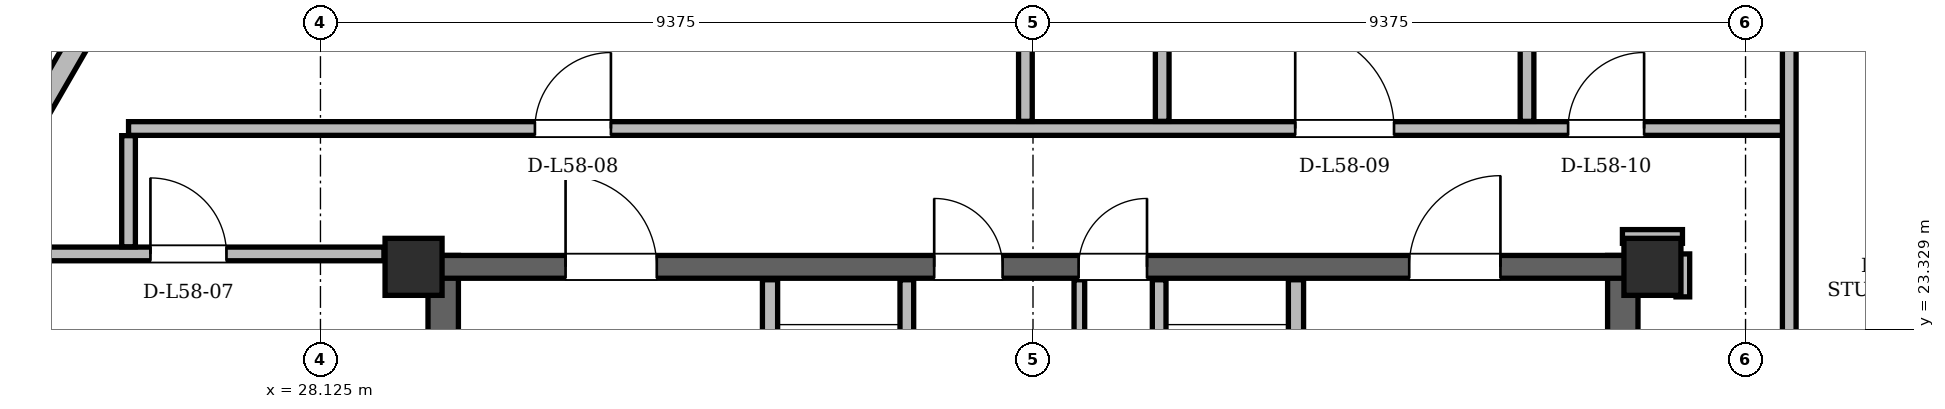
"""IFC4 building model, lengths in metres.
Left out: names, types, materials, properties, quantities, classifications, styles, units other than length and angle.
Written with IfcOpenShell. Run it as: python <this file> out.ifc"""

import sys

from ifc_helpers import new_model, si_unit, direction, frame, frame_2d, origin, origin_2d, place, context, subcontext, project, spatial, rectangle, hollow_rectangle, extrude, element, fill, save


model = new_model("IFC4")
c1 = context("Model", 3, precision=1e-05, world=origin(), true_north=direction((0.0, 1.0)))
c2 = subcontext(c1, "Body", "Model", "MODEL_VIEW")
j1 = project(units=[si_unit("LENGTHUNIT", "METRE"), si_unit("PLANEANGLEUNIT", "RADIAN")], contexts=[c1])
p1 = place(None, origin())
s1 = spatial("IfcSite", under=j1, at=p1, CompositionType="ELEMENT")
p2 = place(p1, origin())
s2 = spatial("IfcBuilding", under=s1, at=p2, CompositionType="ELEMENT")
p3 = place(p2, frame((0.0, 0.0, 219.9)))
s3 = spatial("IfcBuildingStorey", under=s2, at=p3, CompositionType="ELEMENT", Elevation=219.9)
for number, where, z_axis, x_axis in (
    (1, (45.65, 24.15, 0.0), (0.0, 0.0, 1.0), (1.0, 0.0, 0.0)),
    (2, (29.35, 24.15, 0.0), (0.0, 0.0, 1.0), (1.0, 0.0, 0.0)),
):
    element("IfcColumn", number, at=place(p3, frame(where, z_axis=z_axis, x_axis=x_axis)), inside=s3, PredefinedType="COLUMN", context=c2, shape_type="SweptSolid", body=[
        extrude(hollow_rectangle(XDim=0.75, YDim=0.75, WallThickness=0.06, at=origin_2d()), origin(), (0.0, 0.0, 1.0), 3.6),
    ])
for number, where, z_axis, x_axis in (
    (3, (29.74, 11.0, 0.0), (0.0, 0.0, 1.0), (0.0, 1.0, 0.0)),
    (4, (45.26, 11.0, 0.0), (0.0, 0.0, 1.0), (0.0, 1.0, 0.0)),
):
    element("IfcWall", number, at=place(p3, frame(where, z_axis=z_axis, x_axis=x_axis)), inside=s3, PredefinedType="SHEAR", context=c2, shape_type="SweptSolid", body=[
        extrude(rectangle(XDim=13.3, YDim=0.4, at=frame_2d((6.65, 0.0))), origin(), (0.0, 0.0, 1.0), 3.38),
    ])
p4 = place(p3, frame((29.65, 24.15, 0.0), z_axis=(0.0, 0.0, 1.0), x_axis=(1.0, 0.0, 0.0)))
e5 = element("IfcWall", 5, at=p4, inside=s3, PredefinedType="SHEAR", context=c2, shape_type="SweptSolid", body=[
    extrude(rectangle(XDim=15.7, YDim=0.3, at=frame_2d((7.85, 0.0))), origin(), (0.0, 0.0, 1.0), 3.38),
])
p5 = place(p4, frame((1.7, 0.0, 0.0)))
e6 = element("IfcOpeningElement", 6, at=p5, cuts=e5, PredefinedType="OPENING", context=c2, shape_type="SweptSolid", body=[
    extrude(rectangle(XDim=1.2, YDim=2.2, at=frame_2d((0.6, 1.1))), frame((0.0, 0.15, 0.0), z_axis=(0.0, -1.0, 0.0), x_axis=(1.0, 0.0, 0.0)), (0.0, 0.0, 1.0), 0.3),
])
p6 = place(p4, frame((12.8, 0.0, 0.0)))
e7 = element("IfcOpeningElement", 7, at=p6, cuts=e5, PredefinedType="OPENING", context=c2, shape_type="SweptSolid", body=[
    extrude(rectangle(XDim=1.2, YDim=2.2, at=frame_2d((0.6, 1.1))), frame((0.0, 0.15, 0.0), z_axis=(0.0, -1.0, 0.0), x_axis=(1.0, 0.0, 0.0)), (0.0, 0.0, 1.0), 0.3),
])
p7 = place(p4, frame((6.55, 0.0, 0.0)))
e8 = element("IfcOpeningElement", 8, at=p7, cuts=e5, PredefinedType="OPENING", context=c2, shape_type="SweptSolid", body=[
    extrude(rectangle(XDim=0.9, YDim=2.05, at=frame_2d((0.45, 1.025))), frame((0.0, 0.15, 0.0), z_axis=(0.0, -1.0, 0.0), x_axis=(1.0, 0.0, 0.0)), (0.0, 0.0, 1.0), 0.3),
])
p8 = place(p4, frame((8.45, 0.0, 0.0)))
e9 = element("IfcOpeningElement", 9, at=p8, cuts=e5, PredefinedType="OPENING", context=c2, shape_type="SweptSolid", body=[
    extrude(rectangle(XDim=0.9, YDim=2.05, at=frame_2d((0.45, 1.025))), frame((0.0, 0.15, 0.0), z_axis=(0.0, -1.0, 0.0), x_axis=(1.0, 0.0, 0.0)), (0.0, 0.0, 1.0), 0.3),
])
p9 = place(p3, frame((59.113, 11.428, 0.0), z_axis=(0.0, 0.0, 1.0), x_axis=(-0.499994551211, 0.866028549621, 0.0)))
e10 = element("IfcWall", 10, at=p9, inside=s3, PredefinedType="SOLIDWALL", context=c2, shape_type="SweptSolid", body=[
    extrude(rectangle(XDim=36.634, YDim=0.29, at=frame_2d((18.317, 0.0))), origin(), (0.0, 0.0, 1.0), 2.677),
])
p10 = place(p9, frame((3.429, 0.0, 0.0)))
e11 = element("IfcOpeningElement", 11, at=p10, cuts=e10, PredefinedType="OPENING", context=c2, shape_type="SweptSolid", body=[
    extrude(rectangle(XDim=1.5, YDim=2.2, at=frame_2d((0.75, 1.1))), frame((0.0, 0.145, 0.0), z_axis=(0.0, -1.0, 0.0), x_axis=(1.0, 0.0, 0.0)), (0.0, 0.0, 1.0), 0.29),
])
p11 = place(p9, frame((27.099, 0.0, 0.0)))
e12 = element("IfcOpeningElement", 12, at=p11, cuts=e10, PredefinedType="OPENING", context=c2, shape_type="SweptSolid", body=[
    extrude(rectangle(XDim=1.5, YDim=2.2, at=frame_2d((0.75, 1.1))), frame((0.0, 0.145, 0.0), z_axis=(0.0, -1.0, 0.0), x_axis=(1.0, 0.0, 0.0)), (0.0, 0.0, 1.0), 0.29),
])
p12 = place(p9, frame((7.895, 0.0, 0.85)))
e13 = element("IfcOpeningElement", 13, at=p12, cuts=e10, PredefinedType="OPENING", context=c2, shape_type="SweptSolid", body=[
    extrude(rectangle(XDim=1.2, YDim=1.48, at=frame_2d((0.6, 0.74))), frame((0.0, 0.145, 0.0), z_axis=(0.0, -1.0, 0.0), x_axis=(1.0, 0.0, 0.0)), (0.0, 0.0, 1.0), 0.29),
])
p13 = place(p9, frame((1.262, 0.0, 0.85)))
e14 = element("IfcOpeningElement", 14, at=p13, cuts=e10, PredefinedType="OPENING", context=c2, shape_type="SweptSolid", body=[
    extrude(rectangle(XDim=1.2, YDim=1.48, at=frame_2d((0.6, 0.74))), frame((0.0, 0.145, 0.0), z_axis=(0.0, -1.0, 0.0), x_axis=(1.0, 0.0, 0.0)), (0.0, 0.0, 1.0), 0.29),
])
p14 = place(p9, frame((12.216, 0.0, 0.85)))
e15 = element("IfcOpeningElement", 15, at=p14, cuts=e10, PredefinedType="OPENING", context=c2, shape_type="SweptSolid", body=[
    extrude(rectangle(XDim=2.0, YDim=1.717, at=frame_2d((1.0, 0.858))), frame((0.0, 0.145, 0.0), z_axis=(0.0, -1.0, 0.0), x_axis=(1.0, 0.0, 0.0)), (0.0, 0.0, 1.0), 0.29),
])
p15 = place(p9, frame((17.285, 0.0, 0.85)))
e16 = element("IfcOpeningElement", 16, at=p15, cuts=e10, PredefinedType="OPENING", context=c2, shape_type="SweptSolid", body=[
    extrude(rectangle(XDim=1.4, YDim=1.6, at=frame_2d((0.7, 0.8))), frame((0.0, 0.145, 0.0), z_axis=(0.0, -1.0, 0.0), x_axis=(1.0, 0.0, 0.0)), (0.0, 0.0, 1.0), 0.29),
])
p16 = place(p9, frame((20.673, 0.0, 0.85)))
e17 = element("IfcOpeningElement", 17, at=p16, cuts=e10, PredefinedType="OPENING", context=c2, shape_type="SweptSolid", body=[
    extrude(rectangle(XDim=1.2, YDim=1.48, at=frame_2d((0.6, 0.74))), frame((0.0, 0.145, 0.0), z_axis=(0.0, -1.0, 0.0), x_axis=(1.0, 0.0, 0.0)), (0.0, 0.0, 1.0), 0.29),
])
p17 = place(p9, frame((34.257, 0.0, 0.85)))
e18 = element("IfcOpeningElement", 18, at=p17, cuts=e10, PredefinedType="OPENING", context=c2, shape_type="SweptSolid", body=[
    extrude(rectangle(XDim=1.2, YDim=1.48, at=frame_2d((0.6, 0.74))), frame((0.0, 0.145, 0.0), z_axis=(0.0, -1.0, 0.0), x_axis=(1.0, 0.0, 0.0)), (0.0, 0.0, 1.0), 0.29),
])
p18 = place(p3, frame((34.203, 43.154, 0.0), z_axis=(0.0, 0.0, 1.0), x_axis=(-0.499994551211, -0.866028549621, 0.0)))
e19 = element("IfcWall", 19, at=p18, inside=s3, PredefinedType="SOLIDWALL", context=c2, shape_type="SweptSolid", body=[
    extrude(rectangle(XDim=36.634, YDim=0.29, at=frame_2d((18.317, 0.0))), origin(), (0.0, 0.0, 1.0), 2.677),
])
p19 = place(p18, frame((3.429, 0.0, 0.0)))
e20 = element("IfcOpeningElement", 20, at=p19, cuts=e19, PredefinedType="OPENING", context=c2, shape_type="SweptSolid", body=[
    extrude(rectangle(XDim=1.5, YDim=2.2, at=frame_2d((0.75, 1.1))), frame((0.0, 0.145, 0.0), z_axis=(0.0, -1.0, 0.0), x_axis=(1.0, 0.0, 0.0)), (0.0, 0.0, 1.0), 0.29),
])
p20 = place(p18, frame((27.099, 0.0, 0.0)))
e21 = element("IfcOpeningElement", 21, at=p20, cuts=e19, PredefinedType="OPENING", context=c2, shape_type="SweptSolid", body=[
    extrude(rectangle(XDim=1.5, YDim=2.2, at=frame_2d((0.75, 1.1))), frame((0.0, 0.145, 0.0), z_axis=(0.0, -1.0, 0.0), x_axis=(1.0, 0.0, 0.0)), (0.0, 0.0, 1.0), 0.29),
])
p21 = place(p18, frame((22.904, 0.0, 0.85)))
e22 = element("IfcOpeningElement", 22, at=p21, cuts=e19, PredefinedType="OPENING", context=c2, shape_type="SweptSolid", body=[
    extrude(rectangle(XDim=1.2, YDim=1.48, at=frame_2d((0.6, 0.74))), frame((0.0, 0.145, 0.0), z_axis=(0.0, -1.0, 0.0), x_axis=(1.0, 0.0, 0.0)), (0.0, 0.0, 1.0), 0.29),
])
p22 = place(p18, frame((33.102, 0.0, 0.85)))
e23 = element("IfcOpeningElement", 23, at=p22, cuts=e19, PredefinedType="OPENING", context=c2, shape_type="SweptSolid", body=[
    extrude(rectangle(XDim=1.2, YDim=1.48, at=frame_2d((0.6, 0.74))), frame((0.0, 0.145, 0.0), z_axis=(0.0, -1.0, 0.0), x_axis=(1.0, 0.0, 0.0)), (0.0, 0.0, 1.0), 0.29),
])
p23 = place(p18, frame((8.475, 0.0, 0.85)))
e24 = element("IfcOpeningElement", 24, at=p23, cuts=e19, PredefinedType="OPENING", context=c2, shape_type="SweptSolid", body=[
    extrude(rectangle(XDim=1.2, YDim=1.48, at=frame_2d((0.6, 0.74))), frame((0.0, 0.145, 0.0), z_axis=(0.0, -1.0, 0.0), x_axis=(1.0, 0.0, 0.0)), (0.0, 0.0, 1.0), 0.29),
])
p24 = place(p18, frame((15.529, 0.0, 0.85)))
e25 = element("IfcOpeningElement", 25, at=p24, cuts=e19, PredefinedType="OPENING", context=c2, shape_type="SweptSolid", body=[
    extrude(rectangle(XDim=2.8, YDim=1.717, at=frame_2d((1.4, 0.858))), frame((0.0, 0.145, 0.0), z_axis=(0.0, -1.0, 0.0), x_axis=(1.0, 0.0, 0.0)), (0.0, 0.0, 1.0), 0.29),
])
p25 = place(p18, frame((1.5, 0.0, 0.85)))
e26 = element("IfcOpeningElement", 26, at=p25, cuts=e19, PredefinedType="OPENING", context=c2, shape_type="SweptSolid", body=[
    extrude(rectangle(XDim=1.2, YDim=1.48, at=frame_2d((0.6, 0.74))), frame((0.0, 0.145, 0.0), z_axis=(0.0, -1.0, 0.0), x_axis=(1.0, 0.0, 0.0)), (0.0, 0.0, 1.0), 0.29),
])
p26 = place(p3, frame((34.04, 19.48, 0.0), z_axis=(0.0, 0.0, 1.0), x_axis=(0.0, 1.0, 0.0)))
e27 = element("IfcWall", 27, at=p26, inside=s3, PredefinedType="PARTITIONING", context=c2, shape_type="SweptSolid", body=[
    extrude(rectangle(XDim=4.5, YDim=0.2, at=frame_2d((2.25, 0.0))), origin(), (0.0, 0.0, 1.0), 3.38),
])
p27 = place(p26, frame((2.12, 0.0, 0.0)))
e28 = element("IfcOpeningElement", 28, at=p27, cuts=e27, PredefinedType="OPENING", context=c2, shape_type="SweptSolid", body=[
    extrude(rectangle(XDim=1.1, YDim=2.2, at=frame_2d((0.55, 1.1))), frame((0.0, 0.1, 0.0), z_axis=(0.0, -1.0, 0.0), x_axis=(1.0, 0.0, 0.0)), (0.0, 0.0, 1.0), 0.2),
])
p28 = place(p3, frame((35.84, 20.96, 0.0), z_axis=(0.0, 0.0, 1.0), x_axis=(0.0, 1.0, 0.0)))
e29 = element("IfcWall", 29, at=p28, inside=s3, PredefinedType="PARTITIONING", context=c2, shape_type="SweptSolid", body=[
    extrude(rectangle(XDim=3.02, YDim=0.18, at=frame_2d((1.51, 0.0))), origin(), (0.0, 0.0, 1.0), 3.38),
])
p29 = place(p3, frame((40.96, 19.48, 0.0), z_axis=(0.0, 0.0, 1.0), x_axis=(0.0, 1.0, 0.0)))
e30 = element("IfcWall", 30, at=p29, inside=s3, PredefinedType="PARTITIONING", context=c2, shape_type="SweptSolid", body=[
    extrude(rectangle(XDim=4.5, YDim=0.2, at=frame_2d((2.25, 0.0))), origin(), (0.0, 0.0, 1.0), 3.38),
])
p30 = place(p29, frame((2.12, 0.0, 0.0)))
e31 = element("IfcOpeningElement", 31, at=p30, cuts=e30, PredefinedType="OPENING", context=c2, shape_type="SweptSolid", body=[
    extrude(rectangle(XDim=1.1, YDim=2.2, at=frame_2d((0.55, 1.1))), frame((0.0, 0.1, 0.0), z_axis=(0.0, -1.0, 0.0), x_axis=(1.0, 0.0, 0.0)), (0.0, 0.0, 1.0), 0.2),
])
p31 = place(p3, frame((39.16, 20.96, 0.0), z_axis=(0.0, 0.0, 1.0), x_axis=(0.0, 1.0, 0.0)))
e32 = element("IfcWall", 32, at=p31, inside=s3, PredefinedType="PARTITIONING", context=c2, shape_type="SweptSolid", body=[
    extrude(rectangle(XDim=3.02, YDim=0.18, at=frame_2d((1.51, 0.0))), origin(), (0.0, 0.0, 1.0), 3.38),
])
p32 = place(p3, frame((38.11, 21.06, 0.0), z_axis=(0.0, 0.0, 1.0), x_axis=(0.0, 1.0, 0.0)))
e33 = element("IfcWall", 33, at=p32, inside=s3, PredefinedType="PARTITIONING", context=c2, shape_type="SweptSolid", body=[
    extrude(rectangle(XDim=2.92, YDim=0.14, at=frame_2d((1.46, 0.0))), origin(), (0.0, 0.0, 1.0), 3.38),
])
p33 = place(p3, frame((23.502, 24.32, 0.0), z_axis=(0.0, 0.0, 1.0), x_axis=(1.0, 0.0, 0.0)))
e34 = element("IfcWall", 34, at=p33, inside=s3, PredefinedType="PARTITIONING", context=c2, shape_type="SweptSolid", body=[
    extrude(rectangle(XDim=5.458, YDim=0.18, at=frame_2d((2.729, 0.0))), origin(), (0.0, 0.0, 1.0), 3.38),
])
p34 = place(p33, frame((2.386, 0.0, 0.0)))
e35 = element("IfcOpeningElement", 35, at=p34, cuts=e34, PredefinedType="OPENING", context=c2, shape_type="SweptSolid", body=[
    extrude(rectangle(XDim=1.0, YDim=2.18, at=frame_2d((0.5, 1.09))), frame((0.0, 0.09, 0.0), z_axis=(0.0, -1.0, 0.0), x_axis=(1.0, 0.0, 0.0)), (0.0, 0.0, 1.0), 0.18),
])
p35 = place(p3, frame((45.255, 24.55, 0.0), z_axis=(0.0, 0.0, 1.0), x_axis=(1.0, 0.0, 0.0)))
e36 = element("IfcWall", 36, at=p35, inside=s3, PredefinedType="PARTITIONING", context=c2, shape_type="SweptSolid", body=[
    extrude(rectangle(XDim=0.79, YDim=0.18, at=frame_2d((0.395, 0.0))), origin(), (0.0, 0.0, 1.0), 2.913),
])
p36 = place(p3, frame((25.6, 25.97, 0.0), z_axis=(0.0, 0.0, 1.0), x_axis=(1.0, 0.0, 0.0)))
e37 = element("IfcWall", 37, at=p36, inside=s3, PredefinedType="PARTITIONING", context=c2, shape_type="SweptSolid", body=[
    extrude(rectangle(XDim=21.85, YDim=0.18, at=frame_2d((10.925, 0.0))), origin(), (0.0, 0.0, 1.0), 2.913),
])
p37 = place(p36, frame((5.347, 0.0, 0.0)))
e38 = element("IfcOpeningElement", 38, at=p37, cuts=e37, PredefinedType="OPENING", context=c2, shape_type="SweptSolid", body=[
    extrude(rectangle(XDim=1.0, YDim=2.18, at=frame_2d((0.5, 1.09))), frame((0.0, 0.09, 0.0), z_axis=(0.0, -1.0, 0.0), x_axis=(1.0, 0.0, 0.0)), (0.0, 0.0, 1.0), 0.18),
])
p38 = place(p36, frame((15.35, 0.0, 0.0)))
e39 = element("IfcOpeningElement", 39, at=p38, cuts=e37, PredefinedType="OPENING", context=c2, shape_type="SweptSolid", body=[
    extrude(rectangle(XDim=1.3, YDim=2.2, at=frame_2d((0.65, 1.1))), frame((0.0, 0.09, 0.0), z_axis=(0.0, -1.0, 0.0), x_axis=(1.0, 0.0, 0.0)), (0.0, 0.0, 1.0), 0.18),
])
p39 = place(p36, frame((18.94, 0.0, 0.0)))
e40 = element("IfcOpeningElement", 40, at=p39, cuts=e37, PredefinedType="OPENING", context=c2, shape_type="SweptSolid", body=[
    extrude(rectangle(XDim=1.0, YDim=2.18, at=frame_2d((0.5, 1.09))), frame((0.0, 0.09, 0.0), z_axis=(0.0, -1.0, 0.0), x_axis=(1.0, 0.0, 0.0)), (0.0, 0.0, 1.0), 0.18),
])
p40 = place(p3, frame((25.6, 24.414, 0.0), z_axis=(0.0, 0.0, 1.0), x_axis=(0.0, 1.0, 0.0)))
e41 = element("IfcWall", 41, at=p40, inside=s3, PredefinedType="PARTITIONING", context=c2, shape_type="SweptSolid", body=[
    extrude(rectangle(XDim=1.462, YDim=0.18, at=frame_2d((0.731, 0.0))), origin(), (0.0, 0.0, 1.0), 3.38),
])
p41 = place(p3, frame((37.4, 26.064, 0.0), z_axis=(0.0, 0.0, 1.0), x_axis=(0.0, 1.0, 0.0)))
e42 = element("IfcWall", 42, at=p41, inside=s3, PredefinedType="PARTITIONING", context=c2, shape_type="SweptSolid", body=[
    extrude(rectangle(XDim=16.941, YDim=0.18, at=frame_2d((8.47, 0.0))), origin(), (0.0, 0.0, 1.0), 3.38),
])
p42 = place(p3, frame((39.2, 26.064, 0.0), z_axis=(0.0, 0.0, 1.0), x_axis=(0.0, 1.0, 0.0)))
e43 = element("IfcWall", 43, at=p42, inside=s3, PredefinedType="PARTITIONING", context=c2, shape_type="SweptSolid", body=[
    extrude(rectangle(XDim=4.312, YDim=0.18, at=frame_2d((2.156, 0.0))), origin(), (0.0, 0.0, 1.0), 3.38),
])
p43 = place(p3, frame((44.0, 26.064, 0.0), z_axis=(0.0, 0.0, 1.0), x_axis=(0.0, 1.0, 0.0)))
e44 = element("IfcWall", 44, at=p43, inside=s3, PredefinedType="PARTITIONING", context=c2, shape_type="SweptSolid", body=[
    extrude(rectangle(XDim=4.312, YDim=0.18, at=frame_2d((2.156, 0.0))), origin(), (0.0, 0.0, 1.0), 2.913),
])
p44 = place(p3, frame((46.05, 23.755, 0.0), z_axis=(0.0, 0.0, 1.0), x_axis=(0.0, 1.0, 0.0)))
e45 = element("IfcWall", 45, at=p44, inside=s3, PredefinedType="PARTITIONING", context=c2, shape_type="SweptSolid", body=[
    extrude(rectangle(XDim=0.565, YDim=0.18, at=frame_2d((0.283, 0.0))), origin(), (0.0, 0.0, 1.0), 3.38),
])
p45 = place(p3, frame((47.45, 5.867, 0.0), z_axis=(0.0, 0.0, 1.0), x_axis=(0.0, 1.0, 0.0)))
e46 = element("IfcWall", 46, at=p45, inside=s3, PredefinedType="PARTITIONING", context=c2, shape_type="SweptSolid", body=[
    extrude(rectangle(XDim=25.465, YDim=0.18, at=frame_2d((12.732, 0.0))), origin(), (0.0, 0.0, 1.0), 2.913),
])
p46 = place(p45, frame((9.055, 0.0, 0.0)))
e47 = element("IfcOpeningElement", 47, at=p46, cuts=e46, PredefinedType="OPENING", context=c2, shape_type="SweptSolid", body=[
    extrude(rectangle(XDim=1.0, YDim=2.18, at=frame_2d((0.5, 1.09))), frame((0.0, 0.09, 0.0), z_axis=(0.0, -1.0, 0.0), x_axis=(1.0, 0.0, 0.0)), (0.0, 0.0, 1.0), 0.18),
])
p47 = place(p45, frame((15.845, 0.0, 0.0)))
e48 = element("IfcOpeningElement", 48, at=p47, cuts=e46, PredefinedType="OPENING", context=c2, shape_type="SweptSolid", body=[
    extrude(rectangle(XDim=1.0, YDim=2.18, at=frame_2d((0.5, 1.09))), frame((0.0, 0.09, 0.0), z_axis=(0.0, -1.0, 0.0), x_axis=(1.0, 0.0, 0.0)), (0.0, 0.0, 1.0), 0.18),
])
p48 = place(p5, origin())
e49 = element("IfcDoor", 49, at=p48, inside=s3, OperationType="SINGLE_SWING_LEFT", PredefinedType="DOOR", context=c2, shape_type="SweptSolid", body=[
    extrude(rectangle(XDim=1.2, YDim=2.2, at=frame_2d((0.6, 1.1))), frame((0.0, 0.025, 0.0), z_axis=(0.0, -1.0, 0.0), x_axis=(1.0, 0.0, 0.0)), (0.0, 0.0, 1.0), 0.05),
])
fill(e6, e49)
p49 = place(p6, origin())
e50 = element("IfcDoor", 50, at=p49, inside=s3, OperationType="SINGLE_SWING_RIGHT", PredefinedType="DOOR", context=c2, shape_type="SweptSolid", body=[
    extrude(rectangle(XDim=1.2, YDim=2.2, at=frame_2d((0.6, 1.1))), frame((0.0, 0.025, 0.0), z_axis=(0.0, -1.0, 0.0), x_axis=(1.0, 0.0, 0.0)), (0.0, 0.0, 1.0), 0.05),
])
fill(e7, e50)
p50 = place(p7, origin())
e51 = element("IfcDoor", 51, at=p50, inside=s3, OperationType="SINGLE_SWING_LEFT", PredefinedType="DOOR", context=c2, shape_type="SweptSolid", body=[
    extrude(rectangle(XDim=0.9, YDim=2.05, at=frame_2d((0.45, 1.025))), frame((0.0, 0.025, 0.0), z_axis=(0.0, -1.0, 0.0), x_axis=(1.0, 0.0, 0.0)), (0.0, 0.0, 1.0), 0.05),
])
fill(e8, e51)
p51 = place(p8, origin())
e52 = element("IfcDoor", 52, at=p51, inside=s3, OperationType="SINGLE_SWING_RIGHT", PredefinedType="DOOR", context=c2, shape_type="SweptSolid", body=[
    extrude(rectangle(XDim=0.9, YDim=2.05, at=frame_2d((0.45, 1.025))), frame((0.0, 0.025, 0.0), z_axis=(0.0, -1.0, 0.0), x_axis=(1.0, 0.0, 0.0)), (0.0, 0.0, 1.0), 0.05),
])
fill(e9, e52)
p52 = place(p34, origin())
e53 = element("IfcDoor", 53, at=p52, inside=s3, OperationType="SINGLE_SWING_LEFT", PredefinedType="DOOR", context=c2, shape_type="SweptSolid", body=[
    extrude(rectangle(XDim=1.0, YDim=2.18, at=frame_2d((0.5, 1.09))), frame((0.0, 0.025, 0.0), z_axis=(0.0, -1.0, 0.0), x_axis=(1.0, 0.0, 0.0)), (0.0, 0.0, 1.0), 0.05),
])
fill(e35, e53)
p53 = place(p37, origin())
e54 = element("IfcDoor", 54, at=p53, inside=s3, OperationType="SINGLE_SWING_RIGHT", PredefinedType="DOOR", context=c2, shape_type="SweptSolid", body=[
    extrude(rectangle(XDim=1.0, YDim=2.18, at=frame_2d((0.5, 1.09))), frame((0.0, 0.025, 0.0), z_axis=(0.0, -1.0, 0.0), x_axis=(1.0, 0.0, 0.0)), (0.0, 0.0, 1.0), 0.05),
])
fill(e38, e54)
p54 = place(p38, origin())
e55 = element("IfcDoor", 55, at=p54, inside=s3, OperationType="SINGLE_SWING_LEFT", PredefinedType="DOOR", context=c2, shape_type="SweptSolid", body=[
    extrude(rectangle(XDim=1.3, YDim=2.2, at=frame_2d((0.65, 1.1))), frame((0.0, 0.025, 0.0), z_axis=(0.0, -1.0, 0.0), x_axis=(1.0, 0.0, 0.0)), (0.0, 0.0, 1.0), 0.05),
])
fill(e39, e55)
p55 = place(p39, origin())
e56 = element("IfcDoor", 56, at=p55, inside=s3, OperationType="SINGLE_SWING_RIGHT", PredefinedType="DOOR", context=c2, shape_type="SweptSolid", body=[
    extrude(rectangle(XDim=1.0, YDim=2.18, at=frame_2d((0.5, 1.09))), frame((0.0, 0.025, 0.0), z_axis=(0.0, -1.0, 0.0), x_axis=(1.0, 0.0, 0.0)), (0.0, 0.0, 1.0), 0.05),
])
fill(e40, e56)
save(model, sys.argv[1])
